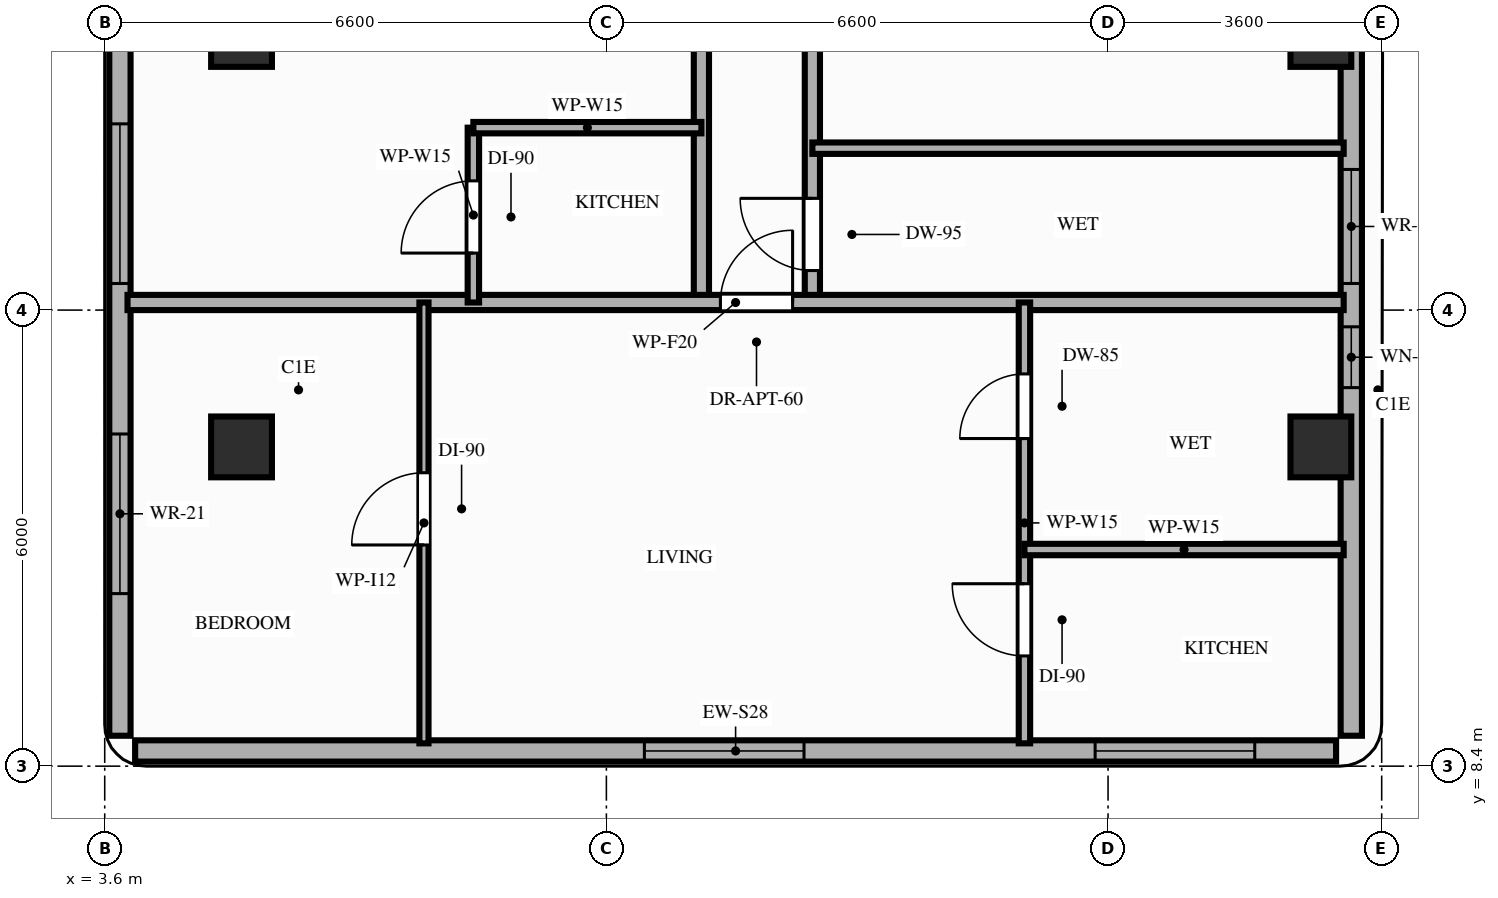
"""IFC4 building model, lengths in metres.
Left out: names, types, materials, properties, quantities, classifications, styles, units other than length and angle.
Written with IfcOpenShell. Run it as: python <this file> out.ifc"""

import sys

from ifc_helpers import new_model, si_unit, direction, frame, frame_2d, origin, origin_2d, place, context, subcontext, project, spatial, rectangle, extrude, element, fill, save


model = new_model("IFC4")
c1 = context("Model", 3, precision=1e-05, world=origin(), true_north=direction((0.0, 1.0)))
c2 = subcontext(c1, "Body", "Model", "MODEL_VIEW")
j1 = project(units=[si_unit("LENGTHUNIT", "METRE"), si_unit("PLANEANGLEUNIT", "RADIAN")], contexts=[c1])
p1 = place(None, origin())
s1 = spatial("IfcSite", under=j1, at=p1, CompositionType="ELEMENT")
p2 = place(p1, origin())
s2 = spatial("IfcBuilding", under=s1, at=p2, CompositionType="ELEMENT")
p3 = place(p2, frame((0.0, 0.0, 224.8)))
s3 = spatial("IfcBuildingStorey", under=s2, at=p3, CompositionType="ELEMENT", Elevation=224.8)
for number, where, z_axis, x_axis in (
    (1, (5.4, 12.6, 0.0), (0.0, 0.0, 1.0), (1.0, 0.0, 0.0)),
    (2, (19.6, 12.6, 0.0), (0.0, 0.0, 1.0), (1.0, 0.0, 0.0)),
    (3, (5.4, 18.0, 0.0), (0.0, 0.0, 1.0), (1.0, 0.0, 0.0)),
    (4, (19.6, 18.0, 0.0), (0.0, 0.0, 1.0), (1.0, 0.0, 0.0)),
):
    element("IfcColumn", number, at=place(p3, frame(where, z_axis=z_axis, x_axis=x_axis)), inside=s3, PredefinedType="COLUMN", context=c2, shape_type="SweptSolid", body=[
        extrude(rectangle(XDim=0.8, YDim=0.8, at=origin_2d()), origin(), (0.0, 0.0, 1.0), 3.2),
    ])
p4 = place(p3, frame((4.0, 8.6, 0.0), z_axis=(0.0, 0.0, 1.0), x_axis=(1.0, 0.0, 0.0)))
e5 = element("IfcWall", 5, at=p4, inside=s3, PredefinedType="STANDARD", context=c2, shape_type="SweptSolid", body=[
    extrude(rectangle(XDim=15.8, YDim=0.28, at=frame_2d((7.9, 0.0))), origin(), (0.0, 0.0, 1.0), 3.02),
])
p5 = place(p4, frame((6.7, 0.0, 0.85)))
e6 = element("IfcOpeningElement", 6, at=p5, cuts=e5, PredefinedType="OPENING", context=c2, shape_type="SweptSolid", body=[
    extrude(rectangle(XDim=2.1, YDim=1.8, at=frame_2d((1.05, 0.9))), frame((0.0, 0.15, 0.0), z_axis=(0.0, -1.0, 0.0), x_axis=(1.0, 0.0, 0.0)), (0.0, 0.0, 1.0), 0.3),
])
p6 = place(p4, frame((12.63, 0.0, 0.85)))
e7 = element("IfcOpeningElement", 7, at=p6, cuts=e5, PredefinedType="OPENING", context=c2, shape_type="SweptSolid", body=[
    extrude(rectangle(XDim=2.1, YDim=1.8, at=frame_2d((1.05, 0.9))), frame((0.0, 0.15, 0.0), z_axis=(0.0, -1.0, 0.0), x_axis=(1.0, 0.0, 0.0)), (0.0, 0.0, 1.0), 0.3),
])
p7 = place(p3, frame((3.8, 42.1, 0.0), z_axis=(0.0, 0.0, 1.0), x_axis=(0.0, -1.0, 0.0)))
e8 = element("IfcWall", 8, at=p7, inside=s3, PredefinedType="STANDARD", context=c2, shape_type="SweptSolid", body=[
    extrude(rectangle(XDim=33.3, YDim=0.28, at=frame_2d((16.65, 0.0))), origin(), (0.0, 0.0, 1.0), 2.71),
])
p8 = place(p7, frame((21.33, 0.0, 0.0)))
e9 = element("IfcOpeningElement", 9, at=p8, cuts=e8, PredefinedType="OPENING", context=c2, shape_type="SweptSolid", body=[
    extrude(rectangle(XDim=1.4, YDim=2.1, at=frame_2d((0.7, 1.05))), frame((0.0, 0.15, 0.0), z_axis=(0.0, -1.0, 0.0), x_axis=(1.0, 0.0, 0.0)), (0.0, 0.0, 1.0), 0.3),
])
p9 = place(p7, frame((29.33, 0.0, 0.85)))
e10 = element("IfcOpeningElement", 10, at=p9, cuts=e8, PredefinedType="OPENING", context=c2, shape_type="SweptSolid", body=[
    extrude(rectangle(XDim=2.1, YDim=1.61, at=frame_2d((1.05, 0.805))), frame((0.0, 0.15, 0.0), z_axis=(0.0, -1.0, 0.0), x_axis=(1.0, 0.0, 0.0)), (0.0, 0.0, 1.0), 0.3),
])
p10 = place(p7, frame((16.2, 0.0, 0.85)))
e11 = element("IfcOpeningElement", 11, at=p10, cuts=e8, PredefinedType="OPENING", context=c2, shape_type="SweptSolid", body=[
    extrude(rectangle(XDim=2.1, YDim=1.61, at=frame_2d((1.05, 0.805))), frame((0.0, 0.15, 0.0), z_axis=(0.0, -1.0, 0.0), x_axis=(1.0, 0.0, 0.0)), (0.0, 0.0, 1.0), 0.3),
])
p11 = place(p7, frame((25.25, 0.0, 0.85)))
e12 = element("IfcOpeningElement", 12, at=p11, cuts=e8, PredefinedType="OPENING", context=c2, shape_type="SweptSolid", body=[
    extrude(rectangle(XDim=2.1, YDim=1.61, at=frame_2d((1.05, 0.805))), frame((0.0, 0.15, 0.0), z_axis=(0.0, -1.0, 0.0), x_axis=(1.0, 0.0, 0.0)), (0.0, 0.0, 1.0), 0.3),
])
p12 = place(p7, frame((9.75, 0.0, 0.85)))
e13 = element("IfcOpeningElement", 13, at=p12, cuts=e8, PredefinedType="OPENING", context=c2, shape_type="SweptSolid", body=[
    extrude(rectangle(XDim=2.1, YDim=1.61, at=frame_2d((1.05, 0.805))), frame((0.0, 0.15, 0.0), z_axis=(0.0, -1.0, 0.0), x_axis=(1.0, 0.0, 0.0)), (0.0, 0.0, 1.0), 0.3),
])
p13 = place(p7, frame((3.65, 0.0, 0.85)))
e14 = element("IfcOpeningElement", 14, at=p13, cuts=e8, PredefinedType="OPENING", context=c2, shape_type="SweptSolid", body=[
    extrude(rectangle(XDim=2.1, YDim=1.61, at=frame_2d((1.05, 0.805))), frame((0.0, 0.15, 0.0), z_axis=(0.0, -1.0, 0.0), x_axis=(1.0, 0.0, 0.0)), (0.0, 0.0, 1.0), 0.3),
])
p14 = place(p3, frame((20.0, 8.8, 0.0), z_axis=(0.0, 0.0, 1.0), x_axis=(0.0, 1.0, 0.0)))
e15 = element("IfcWall", 15, at=p14, inside=s3, PredefinedType="STANDARD", context=c2, shape_type="SweptSolid", body=[
    extrude(rectangle(XDim=23.55, YDim=0.28, at=frame_2d((11.775, 0.0))), origin(), (0.0, 0.0, 1.0), 2.51),
])
p15 = place(p14, frame((4.58, 0.0, 0.85)))
e16 = element("IfcOpeningElement", 16, at=p15, cuts=e15, PredefinedType="OPENING", context=c2, shape_type="SweptSolid", body=[
    extrude(rectangle(XDim=0.8, YDim=1.41, at=frame_2d((0.4, 0.705))), frame((0.0, 0.15, 0.0), z_axis=(0.0, -1.0, 0.0), x_axis=(1.0, 0.0, 0.0)), (0.0, 0.0, 1.0), 0.3),
])
p16 = place(p14, frame((5.95, 0.0, 0.85)))
e17 = element("IfcOpeningElement", 17, at=p16, cuts=e15, PredefinedType="OPENING", context=c2, shape_type="SweptSolid", body=[
    extrude(rectangle(XDim=1.5, YDim=1.41, at=frame_2d((0.75, 0.705))), frame((0.0, 0.15, 0.0), z_axis=(0.0, -1.0, 0.0), x_axis=(1.0, 0.0, 0.0)), (0.0, 0.0, 1.0), 0.3),
])
p17 = place(p14, frame((10.85, 0.0, 0.85)))
e18 = element("IfcOpeningElement", 18, at=p17, cuts=e15, PredefinedType="OPENING", context=c2, shape_type="SweptSolid", body=[
    extrude(rectangle(XDim=2.1, YDim=1.41, at=frame_2d((1.05, 0.705))), frame((0.0, 0.15, 0.0), z_axis=(0.0, -1.0, 0.0), x_axis=(1.0, 0.0, 0.0)), (0.0, 0.0, 1.0), 0.3),
])
p18 = place(p3, frame((11.45, 14.5, 0.0), z_axis=(0.0, 0.0, 1.0), x_axis=(0.0, 1.0, 0.0)))
e19 = element("IfcWall", 19, at=p18, inside=s3, PredefinedType="PARTITIONING", context=c2, shape_type="SweptSolid", body=[
    extrude(rectangle(XDim=13.6, YDim=0.2, at=frame_2d((6.8, 0.0))), origin(), (0.0, 0.0, 1.0), 2.51),
])
p19 = place(p18, frame((4.22, 0.0, 0.0)))
e20 = element("IfcOpeningElement", 20, at=p19, cuts=e19, PredefinedType="OPENING", context=c2, shape_type="SweptSolid", body=[
    extrude(rectangle(XDim=0.95, YDim=2.15, at=frame_2d((0.475, 1.075))), frame((0.0, 0.11, 0.0), z_axis=(0.0, -1.0, 0.0), x_axis=(1.0, 0.0, 0.0)), (0.0, 0.0, 1.0), 0.22),
])
p20 = place(p3, frame((12.91, 14.5, 0.0), z_axis=(0.0, 0.0, 1.0), x_axis=(0.0, 1.0, 0.0)))
e21 = element("IfcWall", 21, at=p20, inside=s3, PredefinedType="PARTITIONING", context=c2, shape_type="SweptSolid", body=[
    extrude(rectangle(XDim=13.6, YDim=0.2, at=frame_2d((6.8, 0.0))), origin(), (0.0, 0.0, 1.0), 2.51),
])
p21 = place(p20, frame((0.42, 0.0, 0.0)))
e22 = element("IfcOpeningElement", 22, at=p21, cuts=e21, PredefinedType="OPENING", context=c2, shape_type="SweptSolid", body=[
    extrude(rectangle(XDim=0.95, YDim=2.1, at=frame_2d((0.475, 1.05))), frame((0.0, 0.11, 0.0), z_axis=(0.0, -1.0, 0.0), x_axis=(1.0, 0.0, 0.0)), (0.0, 0.0, 1.0), 0.22),
])
p22 = place(p20, frame((5.2, 0.0, 0.0)))
e23 = element("IfcOpeningElement", 23, at=p22, cuts=e21, PredefinedType="OPENING", context=c2, shape_type="SweptSolid", body=[
    extrude(rectangle(XDim=0.95, YDim=2.15, at=frame_2d((0.475, 1.075))), frame((0.0, 0.11, 0.0), z_axis=(0.0, -1.0, 0.0), x_axis=(1.0, 0.0, 0.0)), (0.0, 0.0, 1.0), 0.22),
])
p23 = place(p20, frame((10.98, 0.0, 0.0)))
e24 = element("IfcOpeningElement", 24, at=p23, cuts=e21, PredefinedType="OPENING", context=c2, shape_type="SweptSolid", body=[
    extrude(rectangle(XDim=0.95, YDim=2.15, at=frame_2d((0.475, 1.075))), frame((0.0, 0.11, 0.0), z_axis=(0.0, -1.0, 0.0), x_axis=(1.0, 0.0, 0.0)), (0.0, 0.0, 1.0), 0.22),
])
p24 = place(p3, frame((3.9, 14.5, 0.0), z_axis=(0.0, 0.0, 1.0), x_axis=(1.0, 0.0, 0.0)))
e25 = element("IfcWall", 25, at=p24, inside=s3, PredefinedType="PARTITIONING", context=c2, shape_type="SweptSolid", body=[
    extrude(rectangle(XDim=16.0, YDim=0.2, at=frame_2d((8.0, 0.0))), origin(), (0.0, 0.0, 1.0), 2.51),
])
p25 = place(p24, frame((7.8, 0.0, 0.0)))
e26 = element("IfcOpeningElement", 26, at=p25, cuts=e25, PredefinedType="OPENING", context=c2, shape_type="SweptSolid", body=[
    extrude(rectangle(XDim=0.95, YDim=2.15, at=frame_2d((0.475, 1.075))), frame((0.0, 0.11, 0.0), z_axis=(0.0, -1.0, 0.0), x_axis=(1.0, 0.0, 0.0)), (0.0, 0.0, 1.0), 0.22),
])
p26 = place(p3, frame((7.8, 8.7, 0.0), z_axis=(0.0, 0.0, 1.0), x_axis=(0.0, 1.0, 0.0)))
e27 = element("IfcWall", 27, at=p26, inside=s3, PredefinedType="PARTITIONING", context=c2, shape_type="SweptSolid", body=[
    extrude(rectangle(XDim=5.8, YDim=0.12, at=frame_2d((2.9, 0.0))), origin(), (0.0, 0.0, 1.0), 2.51),
])
p27 = place(p26, frame((2.61, 0.0, 0.0)))
e28 = element("IfcOpeningElement", 28, at=p27, cuts=e27, PredefinedType="OPENING", context=c2, shape_type="SweptSolid", body=[
    extrude(rectangle(XDim=0.95, YDim=2.15, at=frame_2d((0.475, 1.075))), frame((0.0, 0.07, 0.0), z_axis=(0.0, -1.0, 0.0), x_axis=(1.0, 0.0, 0.0)), (0.0, 0.0, 1.0), 0.14),
])
p28 = place(p3, frame((15.7, 8.7, 0.0), z_axis=(0.0, 0.0, 1.0), x_axis=(0.0, 1.0, 0.0)))
e29 = element("IfcWall", 29, at=p28, inside=s3, PredefinedType="PARTITIONING", context=c2, shape_type="SweptSolid", body=[
    extrude(rectangle(XDim=5.8, YDim=0.15, at=frame_2d((2.9, 0.0))), origin(), (0.0, 0.0, 1.0), 2.51),
])
p29 = place(p28, frame((1.15, 0.0, 0.0)))
e30 = element("IfcOpeningElement", 30, at=p29, cuts=e29, PredefinedType="OPENING", context=c2, shape_type="SweptSolid", body=[
    extrude(rectangle(XDim=0.95, YDim=2.15, at=frame_2d((0.475, 1.075))), frame((0.0, 0.085, 0.0), z_axis=(0.0, -1.0, 0.0), x_axis=(1.0, 0.0, 0.0)), (0.0, 0.0, 1.0), 0.17),
])
p30 = place(p28, frame((4.01, 0.0, 0.0)))
e31 = element("IfcOpeningElement", 31, at=p30, cuts=e29, PredefinedType="OPENING", context=c2, shape_type="SweptSolid", body=[
    extrude(rectangle(XDim=0.85, YDim=2.1, at=frame_2d((0.425, 1.05))), frame((0.0, 0.085, 0.0), z_axis=(0.0, -1.0, 0.0), x_axis=(1.0, 0.0, 0.0)), (0.0, 0.0, 1.0), 0.17),
])
p31 = place(p3, frame((15.7, 11.25, 0.0), z_axis=(0.0, 0.0, 1.0), x_axis=(1.0, 0.0, 0.0)))
e32 = element("IfcWall", 32, at=p31, inside=s3, PredefinedType="PARTITIONING", context=c2, shape_type="SweptSolid", body=[
    extrude(rectangle(XDim=4.2, YDim=0.15, at=frame_2d((2.1, 0.0))), origin(), (0.0, 0.0, 1.0), 3.02),
])
p32 = place(p3, frame((8.45, 14.5, 0.0), z_axis=(0.0, 0.0, 1.0), x_axis=(0.0, 1.0, 0.0)))
e33 = element("IfcWall", 33, at=p32, inside=s3, PredefinedType="PARTITIONING", context=c2, shape_type="SweptSolid", body=[
    extrude(rectangle(XDim=2.3, YDim=0.15, at=frame_2d((1.15, 0.0))), origin(), (0.0, 0.0, 1.0), 2.71),
])
p33 = place(p32, frame((0.65, 0.0, 0.0)))
e34 = element("IfcOpeningElement", 34, at=p33, cuts=e33, PredefinedType="OPENING", context=c2, shape_type="SweptSolid", body=[
    extrude(rectangle(XDim=0.95, YDim=2.15, at=frame_2d((0.475, 1.075))), frame((0.0, 0.085, 0.0), z_axis=(0.0, -1.0, 0.0), x_axis=(1.0, 0.0, 0.0)), (0.0, 0.0, 1.0), 0.17),
])
p34 = place(p3, frame((8.45, 16.8, 0.0), z_axis=(0.0, 0.0, 1.0), x_axis=(1.0, 0.0, 0.0)))
e35 = element("IfcWall", 35, at=p34, inside=s3, PredefinedType="PARTITIONING", context=c2, shape_type="SweptSolid", body=[
    extrude(rectangle(XDim=3.0, YDim=0.15, at=frame_2d((1.5, 0.0))), origin(), (0.0, 0.0, 1.0), 2.71),
])
p35 = place(p3, frame((12.91, 16.53, 0.0), z_axis=(0.0, 0.0, 1.0), x_axis=(1.0, 0.0, 0.0)))
e36 = element("IfcWall", 36, at=p35, inside=s3, PredefinedType="PARTITIONING", context=c2, shape_type="SweptSolid", body=[
    extrude(rectangle(XDim=6.99, YDim=0.15, at=frame_2d((3.495, 0.0))), origin(), (0.0, 0.0, 1.0), 2.51),
])
p36 = place(p9, origin())
e37 = element("IfcWindow", 37, at=p36, inside=s3, PartitioningType="SINGLE_PANEL", PredefinedType="WINDOW", context=c2, shape_type="SweptSolid", body=[
    extrude(rectangle(XDim=2.1, YDim=1.61, at=frame_2d((1.05, 0.805))), frame((0.0, 0.03, 0.0), z_axis=(0.0, -1.0, 0.0), x_axis=(1.0, 0.0, 0.0)), (0.0, 0.0, 1.0), 0.06),
])
fill(e10, e37)
p37 = place(p5, origin())
e38 = element("IfcWindow", 38, at=p37, inside=s3, PartitioningType="SINGLE_PANEL", PredefinedType="WINDOW", context=c2, shape_type="SweptSolid", body=[
    extrude(rectangle(XDim=2.1, YDim=1.8, at=frame_2d((1.05, 0.9))), frame((0.0, 0.03, 0.0), z_axis=(0.0, -1.0, 0.0), x_axis=(1.0, 0.0, 0.0)), (0.0, 0.0, 1.0), 0.06),
])
fill(e6, e38)
p38 = place(p6, origin())
e39 = element("IfcWindow", 39, at=p38, inside=s3, PartitioningType="SINGLE_PANEL", PredefinedType="WINDOW", context=c2, shape_type="SweptSolid", body=[
    extrude(rectangle(XDim=2.1, YDim=1.8, at=frame_2d((1.05, 0.9))), frame((0.0, 0.03, 0.0), z_axis=(0.0, -1.0, 0.0), x_axis=(1.0, 0.0, 0.0)), (0.0, 0.0, 1.0), 0.06),
])
fill(e7, e39)
p39 = place(p15, origin())
e40 = element("IfcWindow", 40, at=p39, inside=s3, PartitioningType="SINGLE_PANEL", PredefinedType="WINDOW", context=c2, shape_type="SweptSolid", body=[
    extrude(rectangle(XDim=0.8, YDim=1.41, at=frame_2d((0.4, 0.705))), frame((0.0, 0.03, 0.0), z_axis=(0.0, -1.0, 0.0), x_axis=(1.0, 0.0, 0.0)), (0.0, 0.0, 1.0), 0.06),
])
fill(e16, e40)
p40 = place(p11, origin())
e41 = element("IfcWindow", 41, at=p40, inside=s3, PartitioningType="SINGLE_PANEL", PredefinedType="WINDOW", context=c2, shape_type="SweptSolid", body=[
    extrude(rectangle(XDim=2.1, YDim=1.61, at=frame_2d((1.05, 0.805))), frame((0.0, 0.03, 0.0), z_axis=(0.0, -1.0, 0.0), x_axis=(1.0, 0.0, 0.0)), (0.0, 0.0, 1.0), 0.06),
])
fill(e12, e41)
p41 = place(p16, origin())
e42 = element("IfcWindow", 42, at=p41, inside=s3, PartitioningType="SINGLE_PANEL", PredefinedType="WINDOW", context=c2, shape_type="SweptSolid", body=[
    extrude(rectangle(XDim=1.5, YDim=1.41, at=frame_2d((0.75, 0.705))), frame((0.0, 0.03, 0.0), z_axis=(0.0, -1.0, 0.0), x_axis=(1.0, 0.0, 0.0)), (0.0, 0.0, 1.0), 0.06),
])
fill(e17, e42)
p42 = place(p25, origin())
e43 = element("IfcDoor", 43, at=p42, inside=s3, OperationType="SINGLE_SWING_RIGHT", PredefinedType="DOOR", context=c2, shape_type="SweptSolid", body=[
    extrude(rectangle(XDim=0.95, YDim=2.15, at=frame_2d((0.475, 1.075))), frame((0.0, 0.025, 0.0), z_axis=(0.0, -1.0, 0.0), x_axis=(1.0, 0.0, 0.0)), (0.0, 0.0, 1.0), 0.05),
])
fill(e26, e43)
p43 = place(p27, origin())
e44 = element("IfcDoor", 44, at=p43, inside=s3, OperationType="SINGLE_SWING_LEFT", PredefinedType="DOOR", context=c2, shape_type="SweptSolid", body=[
    extrude(rectangle(XDim=0.95, YDim=2.15, at=frame_2d((0.475, 1.075))), frame((0.0, 0.025, 0.0), z_axis=(0.0, -1.0, 0.0), x_axis=(1.0, 0.0, 0.0)), (0.0, 0.0, 1.0), 0.05),
])
fill(e28, e44)
p44 = place(p29, origin())
e45 = element("IfcDoor", 45, at=p44, inside=s3, OperationType="SINGLE_SWING_RIGHT", PredefinedType="DOOR", context=c2, shape_type="SweptSolid", body=[
    extrude(rectangle(XDim=0.95, YDim=2.15, at=frame_2d((0.475, 1.075))), frame((0.0, 0.025, 0.0), z_axis=(0.0, -1.0, 0.0), x_axis=(1.0, 0.0, 0.0)), (0.0, 0.0, 1.0), 0.05),
])
fill(e30, e45)
p45 = place(p30, origin())
e46 = element("IfcDoor", 46, at=p45, inside=s3, OperationType="SINGLE_SWING_LEFT", PredefinedType="DOOR", context=c2, shape_type="SweptSolid", body=[
    extrude(rectangle(XDim=0.85, YDim=2.1, at=frame_2d((0.425, 1.05))), frame((0.0, 0.025, 0.0), z_axis=(0.0, -1.0, 0.0), x_axis=(1.0, 0.0, 0.0)), (0.0, 0.0, 1.0), 0.05),
])
fill(e31, e46)
p46 = place(p33, origin())
e47 = element("IfcDoor", 47, at=p46, inside=s3, OperationType="SINGLE_SWING_LEFT", PredefinedType="DOOR", context=c2, shape_type="SweptSolid", body=[
    extrude(rectangle(XDim=0.95, YDim=2.15, at=frame_2d((0.475, 1.075))), frame((0.0, 0.025, 0.0), z_axis=(0.0, -1.0, 0.0), x_axis=(1.0, 0.0, 0.0)), (0.0, 0.0, 1.0), 0.05),
])
fill(e34, e47)
p47 = place(p21, origin())
e48 = element("IfcDoor", 48, at=p47, inside=s3, OperationType="SINGLE_SWING_RIGHT", PredefinedType="DOOR", context=c2, shape_type="SweptSolid", body=[
    extrude(rectangle(XDim=0.95, YDim=2.1, at=frame_2d((0.475, 1.05))), frame((0.0, 0.025, 0.0), z_axis=(0.0, -1.0, 0.0), x_axis=(1.0, 0.0, 0.0)), (0.0, 0.0, 1.0), 0.05),
])
fill(e22, e48)
save(model, sys.argv[1])
